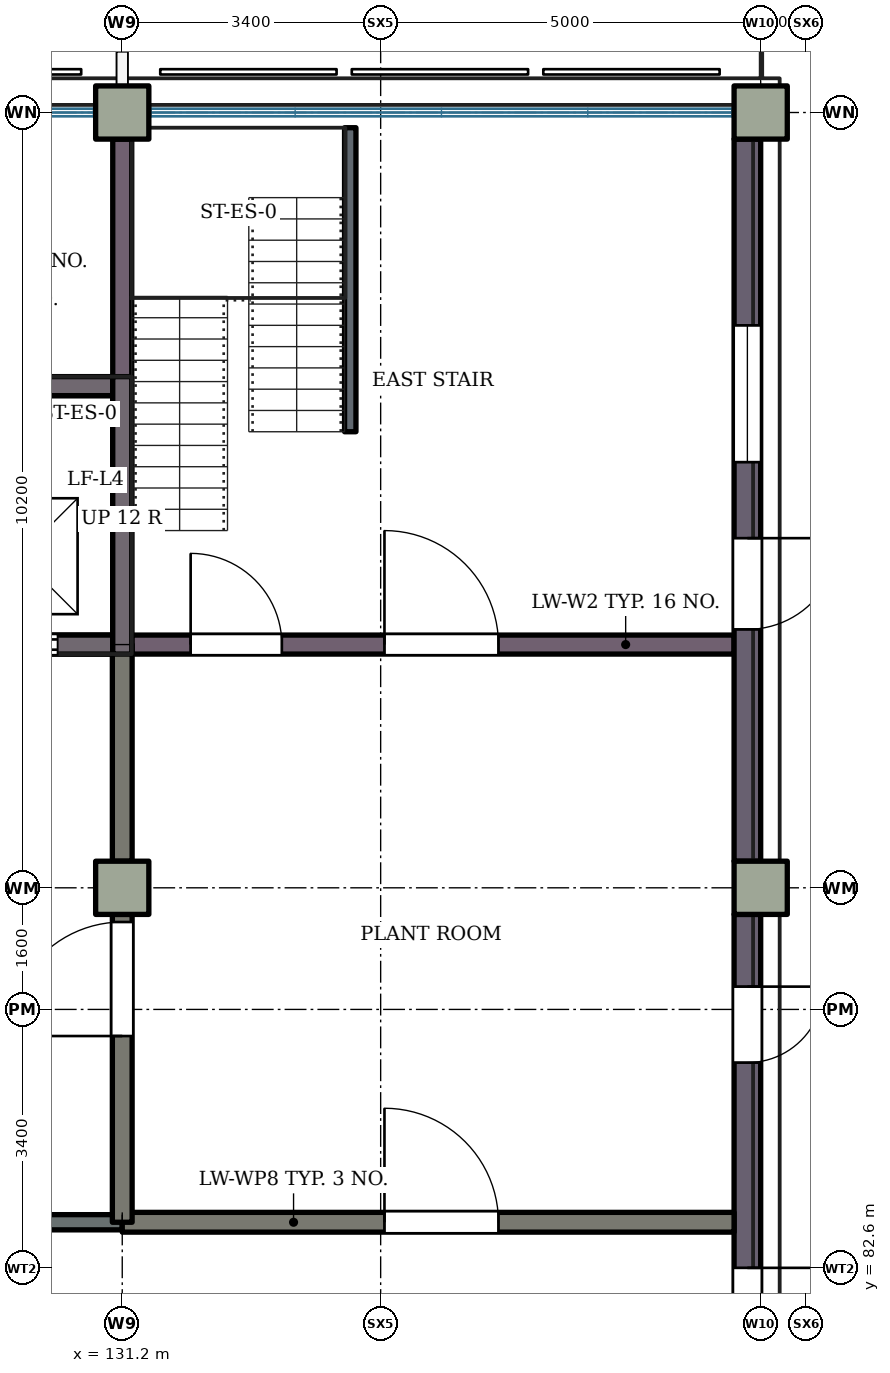
"""IFC4 building model, lengths in metres.
Left out: names, types, materials, properties, quantities, classifications, styles, units other than length and angle.
Written with IfcOpenShell. Run it as: python <this file> out.ifc"""

import sys

from ifc_helpers import new_model, si_unit, direction, frame, frame_2d, origin, origin_2d, place, context, subcontext, project, spatial, rectangle, extrude, element, fill, save


model = new_model("IFC4")
c1 = context("Model", 3, precision=1e-05, world=origin(), true_north=direction((0.0, 1.0)))
c2 = subcontext(c1, "Body", "Model", "MODEL_VIEW")
j1 = project(units=[si_unit("LENGTHUNIT", "METRE"), si_unit("PLANEANGLEUNIT", "RADIAN")], contexts=[c1])
p1 = place(None, origin())
s1 = spatial("IfcSite", under=j1, at=p1, CompositionType="ELEMENT")
p2 = place(p1, origin())
s2 = spatial("IfcBuilding", under=s1, at=p2, CompositionType="ELEMENT")
p3 = place(p2, origin())
s3 = spatial("IfcBuildingStorey", under=s2, at=p3, CompositionType="ELEMENT", Elevation=0.0)
for number, where, z_axis, x_axis in (
    (1, (131.2, 87.6, 0.0), (0.0, 0.0, 1.0), (1.0, 0.0, 0.0)),
    (2, (139.6, 87.6, 0.0), (0.0, 0.0, 1.0), (1.0, 0.0, 0.0)),
    (3, (131.2, 97.8, 0.0), (0.0, 0.0, 1.0), (1.0, 0.0, 0.0)),
    (4, (139.6, 97.8, 0.0), (0.0, 0.0, 1.0), (1.0, 0.0, 0.0)),
):
    element("IfcColumn", number, at=place(p3, frame(where, z_axis=z_axis, x_axis=x_axis)), inside=s3, PredefinedType="COLUMN", context=c2, shape_type="SweptSolid", body=[
        extrude(rectangle(XDim=0.7, YDim=0.7, at=origin_2d()), origin(), (0.0, 0.0, 1.0), 4.2),
    ])
p4 = place(p3, frame((128.625, 90.8, 0.0), z_axis=(0.0, 0.0, 1.0), x_axis=(1.0, 0.0, 0.0)))
e5 = element("IfcWall", 5, at=p4, inside=s3, PredefinedType="SHEAR", context=c2, shape_type="SweptSolid", body=[
    extrude(rectangle(XDim=2.45, YDim=0.25, at=frame_2d((1.225, 0.0))), origin(), (0.0, 0.0, 1.0), 4.2),
])
p5 = place(p4, frame((0.725, 0.0, 0.0)))
e6 = element("IfcOpeningElement", 6, at=p5, cuts=e5, PredefinedType="OPENING", context=c2, shape_type="SweptSolid", body=[
    extrude(rectangle(XDim=1.0, YDim=2.1, at=frame_2d((0.5, 1.05))), frame((0.0, 0.135, 0.0), z_axis=(0.0, -1.0, 0.0), x_axis=(1.0, 0.0, 0.0)), (0.0, 0.0, 1.0), 0.27),
])
p6 = place(p3, frame((131.325, 90.8, 0.0), z_axis=(0.0, 0.0, 1.0), x_axis=(1.0, 0.0, 0.0)))
e7 = element("IfcWall", 7, at=p6, inside=s3, PredefinedType="SHEAR", context=c2, shape_type="SweptSolid", body=[
    extrude(rectangle(XDim=7.925, YDim=0.25, at=frame_2d((3.962, 0.0))), origin(), (0.0, 0.0, 1.0), 4.2),
])
p7 = place(p6, frame((3.325, 0.0, 0.0)))
e8 = element("IfcOpeningElement", 8, at=p7, cuts=e7, PredefinedType="OPENING", context=c2, shape_type="SweptSolid", body=[
    extrude(rectangle(XDim=1.5, YDim=2.1, at=frame_2d((0.75, 1.05))), frame((0.0, 0.135, 0.0), z_axis=(0.0, -1.0, 0.0), x_axis=(1.0, 0.0, 0.0)), (0.0, 0.0, 1.0), 0.27),
])
p8 = place(p6, frame((0.775, 0.0, 0.0)))
e9 = element("IfcOpeningElement", 9, at=p8, cuts=e7, PredefinedType="OPENING", context=c2, shape_type="SweptSolid", body=[
    extrude(rectangle(XDim=1.2, YDim=2.1, at=frame_2d((0.6, 1.05))), frame((0.0, 0.135, 0.0), z_axis=(0.0, -1.0, 0.0), x_axis=(1.0, 0.0, 0.0)), (0.0, 0.0, 1.0), 0.27),
])
p9 = place(p3, frame((128.625, 94.2, 0.0), z_axis=(0.0, 0.0, 1.0), x_axis=(1.0, 0.0, 0.0)))
e10 = element("IfcWall", 10, at=p9, inside=s3, PredefinedType="SHEAR", context=c2, shape_type="SweptSolid", body=[
    extrude(rectangle(XDim=2.45, YDim=0.25, at=frame_2d((1.225, 0.0))), origin(), (0.0, 0.0, 1.0), 4.2),
])
p10 = place(p3, frame((131.2, 90.675, 0.0), z_axis=(0.0, 0.0, 1.0), x_axis=(0.0, 1.0, 0.0)))
e11 = element("IfcWall", 11, at=p10, inside=s3, PredefinedType="SHEAR", context=c2, shape_type="SweptSolid", body=[
    extrude(rectangle(XDim=6.775, YDim=0.25, at=frame_2d((3.387, 0.0))), origin(), (0.0, 0.0, 1.0), 4.2),
])
p11 = place(p3, frame((139.425, 87.25, 0.0), z_axis=(0.0, 0.0, 1.0), x_axis=(0.0, -1.0, 0.0)))
e12 = element("IfcWall", 12, at=p11, inside=s3, PredefinedType="SHEAR", context=c2, shape_type="SweptSolid", body=[
    extrude(rectangle(XDim=8.5, YDim=0.35, at=frame_2d((4.25, 0.0))), origin(), (0.0, 0.0, 1.0), 4.2),
])
p12 = place(p11, frame((4.65, 0.0, 0.0)))
e13 = element("IfcOpeningElement", 13, at=p12, cuts=e12, PredefinedType="OPENING", context=c2, shape_type="SweptSolid", body=[
    extrude(rectangle(XDim=1.8, YDim=2.1, at=frame_2d((0.9, 1.05))), frame((0.0, 0.185, 0.0), z_axis=(0.0, -1.0, 0.0), x_axis=(1.0, 0.0, 0.0)), (0.0, 0.0, 1.0), 0.37),
])
p13 = place(p11, frame((0.95, 0.0, 0.0)))
e14 = element("IfcOpeningElement", 14, at=p13, cuts=e12, PredefinedType="OPENING", context=c2, shape_type="SweptSolid", body=[
    extrude(rectangle(XDim=1.0, YDim=2.1, at=frame_2d((0.5, 1.05))), frame((0.0, 0.185, 0.0), z_axis=(0.0, -1.0, 0.0), x_axis=(1.0, 0.0, 0.0)), (0.0, 0.0, 1.0), 0.37),
])
p14 = place(p3, frame((139.425, 97.45, 0.0), z_axis=(0.0, 0.0, 1.0), x_axis=(0.0, -1.0, 0.0)))
e15 = element("IfcWall", 15, at=p14, inside=s3, PredefinedType="SHEAR", context=c2, shape_type="SweptSolid", body=[
    extrude(rectangle(XDim=9.5, YDim=0.35, at=frame_2d((4.75, 0.0))), origin(), (0.0, 0.0, 1.0), 4.2),
])
p15 = place(p14, frame((5.25, 0.0, 0.0)))
e16 = element("IfcOpeningElement", 16, at=p15, cuts=e15, PredefinedType="OPENING", context=c2, shape_type="SweptSolid", body=[
    extrude(rectangle(XDim=1.2, YDim=2.1, at=frame_2d((0.6, 1.05))), frame((0.0, 0.185, 0.0), z_axis=(0.0, -1.0, 0.0), x_axis=(1.0, 0.0, 0.0)), (0.0, 0.0, 1.0), 0.37),
])
p16 = place(p14, frame((2.45, 0.0, 0.9)))
e17 = element("IfcOpeningElement", 17, at=p16, cuts=e15, PredefinedType="OPENING", context=c2, shape_type="SweptSolid", body=[
    extrude(rectangle(XDim=1.8, YDim=2.1, at=frame_2d((0.9, 1.05))), frame((0.0, 0.185, 0.0), z_axis=(0.0, -1.0, 0.0), x_axis=(1.0, 0.0, 0.0)), (0.0, 0.0, 1.0), 0.37),
])
p17 = place(p3, frame((97.6, 83.2, 0.0), z_axis=(0.0, 0.0, 1.0), x_axis=(1.0, 0.0, 0.0)))
e18 = element("IfcWall", 18, at=p17, inside=s3, PredefinedType="PARTITIONING", context=c2, shape_type="SweptSolid", body=[
    extrude(rectangle(XDim=33.6, YDim=0.2, at=frame_2d((16.8, 0.0))), origin(), (0.0, 0.0, 1.0), 3.92),
])
p18 = place(p17, frame((3.3, 0.0, 0.0)))
e19 = element("IfcOpeningElement", 19, at=p18, cuts=e18, PredefinedType="OPENING", context=c2, shape_type="SweptSolid", body=[
    extrude(rectangle(XDim=1.8, YDim=2.1, at=frame_2d((0.9, 1.05))), frame((0.0, 0.11, 0.0), z_axis=(0.0, -1.0, 0.0), x_axis=(1.0, 0.0, 0.0)), (0.0, 0.0, 1.0), 0.22),
])
p19 = place(p17, frame((11.7, 0.0, 0.0)))
e20 = element("IfcOpeningElement", 20, at=p19, cuts=e18, PredefinedType="OPENING", context=c2, shape_type="SweptSolid", body=[
    extrude(rectangle(XDim=1.8, YDim=2.1, at=frame_2d((0.9, 1.05))), frame((0.0, 0.11, 0.0), z_axis=(0.0, -1.0, 0.0), x_axis=(1.0, 0.0, 0.0)), (0.0, 0.0, 1.0), 0.22),
])
p20 = place(p17, frame((20.1, 0.0, 0.0)))
e21 = element("IfcOpeningElement", 21, at=p20, cuts=e18, PredefinedType="OPENING", context=c2, shape_type="SweptSolid", body=[
    extrude(rectangle(XDim=1.8, YDim=2.1, at=frame_2d((0.9, 1.05))), frame((0.0, 0.11, 0.0), z_axis=(0.0, -1.0, 0.0), x_axis=(1.0, 0.0, 0.0)), (0.0, 0.0, 1.0), 0.22),
])
p21 = place(p17, frame((28.5, 0.0, 0.0)))
e22 = element("IfcOpeningElement", 22, at=p21, cuts=e18, PredefinedType="OPENING", context=c2, shape_type="SweptSolid", body=[
    extrude(rectangle(XDim=1.8, YDim=2.1, at=frame_2d((0.9, 1.05))), frame((0.0, 0.11, 0.0), z_axis=(0.0, -1.0, 0.0), x_axis=(1.0, 0.0, 0.0)), (0.0, 0.0, 1.0), 0.22),
])
p22 = place(p3, frame((131.2, 83.2, 0.0), z_axis=(0.0, 0.0, 1.0), x_axis=(1.0, 0.0, 0.0)))
e23 = element("IfcWall", 23, at=p22, inside=s3, PredefinedType="PARTITIONING", context=c2, shape_type="SweptSolid", body=[
    extrude(rectangle(XDim=8.05, YDim=0.26, at=frame_2d((4.025, 0.0))), origin(), (0.0, 0.0, 1.0), 3.92),
])
p23 = place(p22, frame((3.45, 0.0, 0.0)))
e24 = element("IfcOpeningElement", 24, at=p23, cuts=e23, PredefinedType="OPENING", context=c2, shape_type="SweptSolid", body=[
    extrude(rectangle(XDim=1.5, YDim=2.1, at=frame_2d((0.75, 1.05))), frame((0.0, 0.14, 0.0), z_axis=(0.0, -1.0, 0.0), x_axis=(1.0, 0.0, 0.0)), (0.0, 0.0, 1.0), 0.28),
])
p24 = place(p3, frame((131.2, 83.2, 0.0), z_axis=(0.0, 0.0, 1.0), x_axis=(0.0, 1.0, 0.0)))
e25 = element("IfcWall", 25, at=p24, inside=s3, PredefinedType="PARTITIONING", context=c2, shape_type="SweptSolid", body=[
    extrude(rectangle(XDim=4.05, YDim=0.26, at=frame_2d((2.025, 0.0))), origin(), (0.0, 0.0, 1.0), 3.02),
])
p25 = place(p24, frame((2.45, 0.0, 0.0)))
e26 = element("IfcOpeningElement", 26, at=p25, cuts=e25, PredefinedType="OPENING", context=c2, shape_type="SweptSolid", body=[
    extrude(rectangle(XDim=1.5, YDim=2.1, at=frame_2d((0.75, 1.05))), frame((0.0, 0.14, 0.0), z_axis=(0.0, -1.0, 0.0), x_axis=(1.0, 0.0, 0.0)), (0.0, 0.0, 1.0), 0.28),
])
p26 = place(p3, frame((131.2, 87.95, 0.0), z_axis=(0.0, 0.0, 1.0), x_axis=(0.0, 1.0, 0.0)))
e27 = element("IfcWall", 27, at=p26, inside=s3, PredefinedType="PARTITIONING", context=c2, shape_type="SweptSolid", body=[
    extrude(rectangle(XDim=2.85, YDim=0.26, at=frame_2d((1.425, 0.0))), origin(), (0.0, 0.0, 1.0), 3.02),
])
p27 = place(p3, frame((134.2, 93.6, 0.0), z_axis=(0.0, 0.0, 1.0), x_axis=(0.0, 1.0, 0.0)))
e28 = element("IfcWall", 28, at=p27, inside=s3, PredefinedType="PARTITIONING", context=c2, shape_type="SweptSolid", body=[
    extrude(rectangle(XDim=4.0, YDim=0.15, at=frame_2d((2.0, 0.0))), origin(), (0.0, 0.0, 1.0), 3.92),
])
for number, where, z_axis, x_axis in (
    (29, (128.625, 90.8, -1.2), (0.0, 0.0, 1.0), (1.0, 0.0, 0.0)),
    (30, (128.625, 94.2, -1.2), (0.0, 0.0, 1.0), (1.0, 0.0, 0.0)),
):
    element("IfcWall", number, at=place(p3, frame(where, z_axis=z_axis, x_axis=x_axis)), inside=s3, PredefinedType="SOLIDWALL", context=c2, shape_type="SweptSolid", body=[
        extrude(rectangle(XDim=2.45, YDim=0.25, at=frame_2d((1.225, 0.0))), origin(), (0.0, 0.0, 1.0), 1.2),
    ])
p28 = place(p3, frame((131.2, 90.675, -1.2), z_axis=(0.0, 0.0, 1.0), x_axis=(0.0, 1.0, 0.0)))
e31 = element("IfcWall", 31, at=p28, inside=s3, PredefinedType="SOLIDWALL", context=c2, shape_type="SweptSolid", body=[
    extrude(rectangle(XDim=3.65, YDim=0.25, at=frame_2d((1.825, 0.0))), origin(), (0.0, 0.0, 1.0), 1.2),
])
p29 = place(p12, origin())
e32 = element("IfcDoor", 32, at=p29, inside=s3, OperationType="DOUBLE_DOOR_SINGLE_SWING", PredefinedType="DOOR", context=c2, shape_type="SweptSolid", body=[
    extrude(rectangle(XDim=1.8, YDim=2.1, at=frame_2d((0.9, 1.05))), frame((0.0, 0.025, 0.0), z_axis=(0.0, -1.0, 0.0), x_axis=(1.0, 0.0, 0.0)), (0.0, 0.0, 1.0), 0.05),
])
fill(e13, e32)
p30 = place(p13, origin())
e33 = element("IfcDoor", 33, at=p30, inside=s3, OperationType="SINGLE_SWING_LEFT", PredefinedType="DOOR", context=c2, shape_type="SweptSolid", body=[
    extrude(rectangle(XDim=1.0, YDim=2.1, at=frame_2d((0.5, 1.05))), frame((0.0, 0.025, 0.0), z_axis=(0.0, -1.0, 0.0), x_axis=(1.0, 0.0, 0.0)), (0.0, 0.0, 1.0), 0.05),
])
fill(e14, e33)
p31 = place(p15, origin())
e34 = element("IfcDoor", 34, at=p31, inside=s3, OperationType="SINGLE_SWING_LEFT", PredefinedType="DOOR", context=c2, shape_type="SweptSolid", body=[
    extrude(rectangle(XDim=1.2, YDim=2.1, at=frame_2d((0.6, 1.05))), frame((0.0, 0.025, 0.0), z_axis=(0.0, -1.0, 0.0), x_axis=(1.0, 0.0, 0.0)), (0.0, 0.0, 1.0), 0.05),
])
fill(e16, e34)
p32 = place(p16, origin())
e35 = element("IfcWindow", 35, at=p32, inside=s3, PartitioningType="SINGLE_PANEL", PredefinedType="WINDOW", context=c2, shape_type="SweptSolid", body=[
    extrude(rectangle(XDim=1.8, YDim=2.1, at=frame_2d((0.9, 1.05))), frame((0.0, 0.03, 0.0), z_axis=(0.0, -1.0, 0.0), x_axis=(1.0, 0.0, 0.0)), (0.0, 0.0, 1.0), 0.06),
])
fill(e17, e35)
p33 = place(p23, origin())
e36 = element("IfcDoor", 36, at=p33, inside=s3, OperationType="DOUBLE_DOOR_SINGLE_SWING", PredefinedType="DOOR", context=c2, shape_type="SweptSolid", body=[
    extrude(rectangle(XDim=1.5, YDim=2.1, at=frame_2d((0.75, 1.05))), frame((0.0, 0.025, 0.0), z_axis=(0.0, -1.0, 0.0), x_axis=(1.0, 0.0, 0.0)), (0.0, 0.0, 1.0), 0.05),
])
fill(e24, e36)
p34 = place(p25, origin())
e37 = element("IfcDoor", 37, at=p34, inside=s3, OperationType="DOUBLE_DOOR_SINGLE_SWING", PredefinedType="DOOR", context=c2, shape_type="SweptSolid", body=[
    extrude(rectangle(XDim=1.5, YDim=2.1, at=frame_2d((0.75, 1.05))), frame((0.0, 0.025, 0.0), z_axis=(0.0, -1.0, 0.0), x_axis=(1.0, 0.0, 0.0)), (0.0, 0.0, 1.0), 0.05),
])
fill(e26, e37)
p35 = place(p7, origin())
e38 = element("IfcDoor", 38, at=p35, inside=s3, OperationType="DOUBLE_DOOR_SINGLE_SWING", PredefinedType="DOOR", context=c2, shape_type="SweptSolid", body=[
    extrude(rectangle(XDim=1.5, YDim=2.1, at=frame_2d((0.75, 1.05))), frame((0.0, 0.025, 0.0), z_axis=(0.0, -1.0, 0.0), x_axis=(1.0, 0.0, 0.0)), (0.0, 0.0, 1.0), 0.05),
])
fill(e8, e38)
p36 = place(p5, origin())
e39 = element("IfcDoor", 39, at=p36, inside=s3, OperationType="SLIDING_TO_LEFT", PredefinedType="DOOR", context=c2, shape_type="SweptSolid", body=[
    extrude(rectangle(XDim=1.0, YDim=2.1, at=frame_2d((0.5, 1.05))), frame((0.0, 0.025, 0.0), z_axis=(0.0, -1.0, 0.0), x_axis=(1.0, 0.0, 0.0)), (0.0, 0.0, 1.0), 0.05),
])
fill(e6, e39)
p37 = place(p8, origin())
e40 = element("IfcDoor", 40, at=p37, inside=s3, OperationType="SINGLE_SWING_LEFT", PredefinedType="DOOR", context=c2, shape_type="SweptSolid", body=[
    extrude(rectangle(XDim=1.2, YDim=2.1, at=frame_2d((0.6, 1.05))), frame((0.0, 0.025, 0.0), z_axis=(0.0, -1.0, 0.0), x_axis=(1.0, 0.0, 0.0)), (0.0, 0.0, 1.0), 0.05),
])
fill(e9, e40)
save(model, sys.argv[1])
